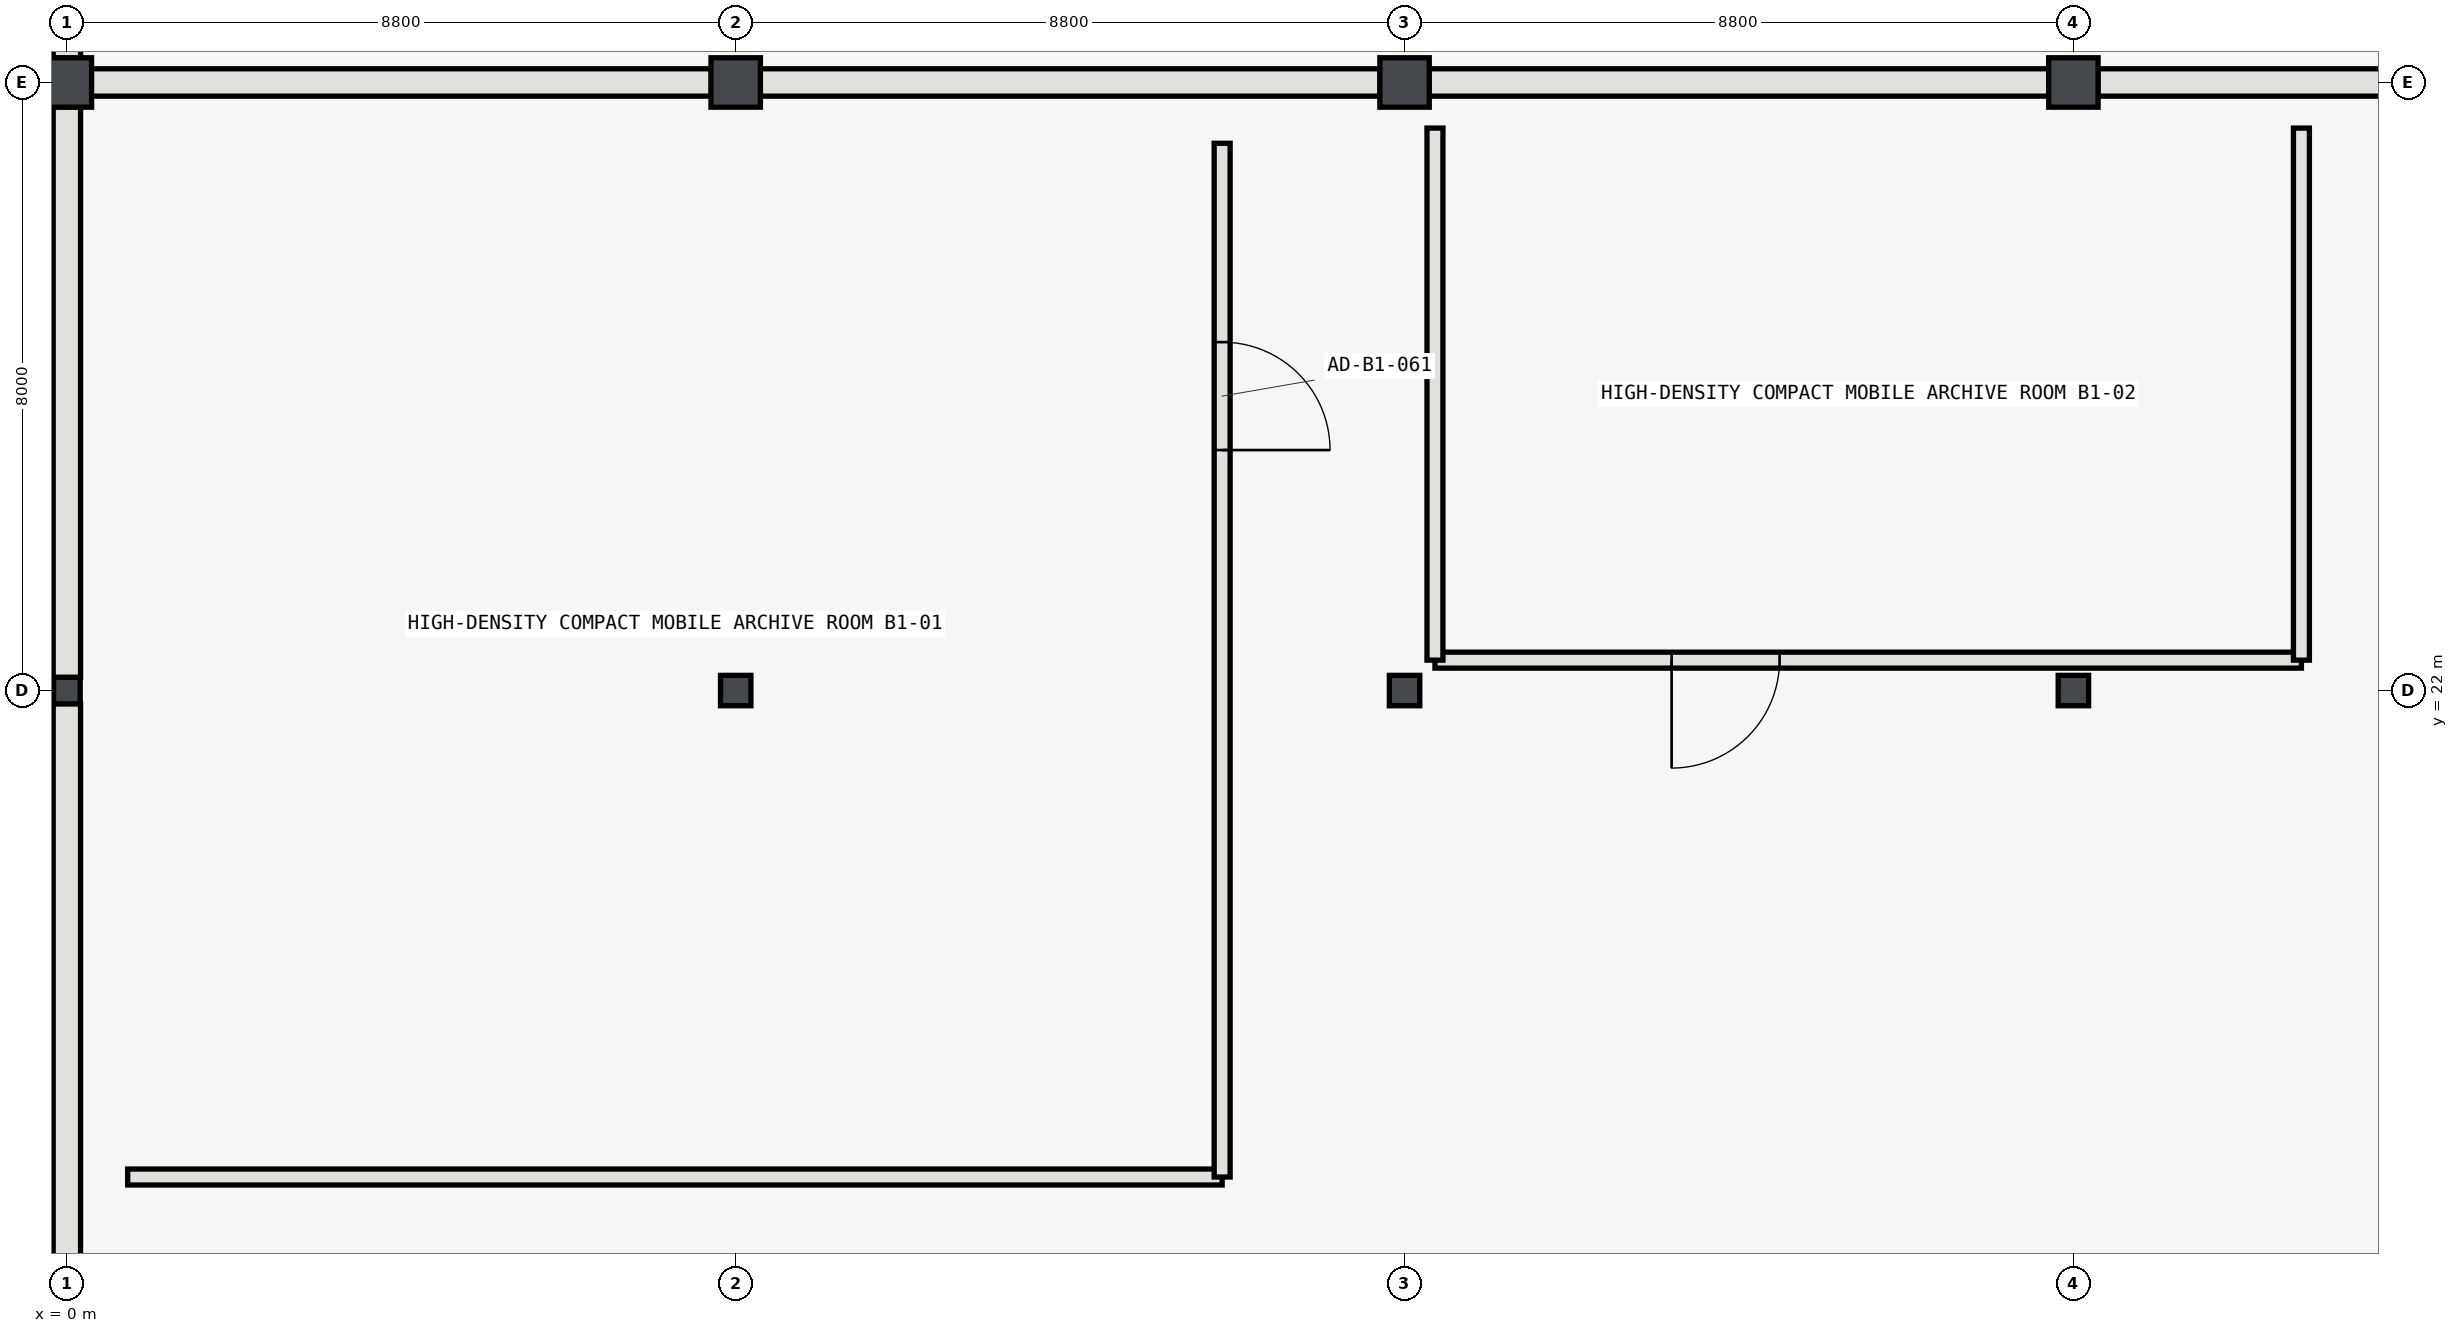
"""IFC4 building model, lengths in metres.
Left out: names, types, materials, properties, quantities, classifications, styles, units other than length and angle.
Written with IfcOpenShell. Run it as: python <this file> out.ifc"""

import sys

from ifc_helpers import new_model, si_unit, direction, frame, frame_2d, origin, origin_2d, place, context, subcontext, project, spatial, rectangle, hollow_rectangle, i_section, extrude, element, fill, save


model = new_model("IFC4")
c1 = context("Model", 3, precision=1e-05, world=origin(), true_north=direction((0.0, 1.0)))
c2 = subcontext(c1, "Body", "Model", "MODEL_VIEW")
j1 = project(units=[si_unit("LENGTHUNIT", "METRE"), si_unit("PLANEANGLEUNIT", "RADIAN")], contexts=[c1])
p1 = place(None, origin())
s1 = spatial("IfcSite", under=j1, at=p1, CompositionType="ELEMENT")
p2 = place(p1, origin())
s2 = spatial("IfcBuilding", under=s1, at=p2, CompositionType="ELEMENT")
p3 = place(p2, frame((0.0, 0.0, -4.8)))
s3 = spatial("IfcBuildingStorey", under=s2, at=p3, CompositionType="ELEMENT", Elevation=-4.8)
p4 = place(p3, frame((0.0, 22.0, 0.0), z_axis=(0.0, 0.0, 1.0), x_axis=(1.0, 0.0, 0.0)))
e1 = element("IfcColumn", 1, at=p4, inside=s3, PredefinedType="COLUMN", context=c2, shape_type="SweptSolid", body=[
    extrude(i_section(OverallWidth=0.35, OverallDepth=0.35, WebThickness=0.012, FlangeThickness=0.019, FilletRadius=0.02, at=origin_2d()), origin(), (0.0, 0.0, 1.0), 4.8),
])
p5 = place(p3, frame((0.0, 30.0, 0.0), z_axis=(0.0, 0.0, 1.0), x_axis=(1.0, 0.0, 0.0)))
e2 = element("IfcColumn", 2, at=p5, inside=s3, PredefinedType="COLUMN", context=c2, shape_type="SweptSolid", body=[
    extrude(hollow_rectangle(XDim=0.65, YDim=0.65, WallThickness=0.026, InnerFilletRadius=0.026, OuterFilletRadius=0.052, at=origin_2d()), origin(), (0.0, 0.0, 1.0), 4.8),
])
p6 = place(p3, frame((8.8, 22.0, 0.0), z_axis=(0.0, 0.0, 1.0), x_axis=(1.0, 0.0, 0.0)))
e3 = element("IfcColumn", 3, at=p6, inside=s3, PredefinedType="COLUMN", context=c2, shape_type="SweptSolid", body=[
    extrude(hollow_rectangle(XDim=0.4, YDim=0.4, WallThickness=0.016, InnerFilletRadius=0.016, OuterFilletRadius=0.032, at=origin_2d()), origin(), (0.0, 0.0, 1.0), 4.8),
])
p7 = place(p3, frame((8.8, 30.0, 0.0), z_axis=(0.0, 0.0, 1.0), x_axis=(1.0, 0.0, 0.0)))
e4 = element("IfcColumn", 4, at=p7, inside=s3, PredefinedType="COLUMN", context=c2, shape_type="SweptSolid", body=[
    extrude(hollow_rectangle(XDim=0.65, YDim=0.65, WallThickness=0.026, InnerFilletRadius=0.026, OuterFilletRadius=0.052, at=origin_2d()), origin(), (0.0, 0.0, 1.0), 4.8),
])
p8 = place(p3, frame((17.6, 22.0, 0.0), z_axis=(0.0, 0.0, 1.0), x_axis=(1.0, 0.0, 0.0)))
e5 = element("IfcColumn", 5, at=p8, inside=s3, PredefinedType="COLUMN", context=c2, shape_type="SweptSolid", body=[
    extrude(hollow_rectangle(XDim=0.4, YDim=0.4, WallThickness=0.016, InnerFilletRadius=0.016, OuterFilletRadius=0.032, at=origin_2d()), origin(), (0.0, 0.0, 1.0), 4.8),
])
p9 = place(p3, frame((17.6, 30.0, 0.0), z_axis=(0.0, 0.0, 1.0), x_axis=(1.0, 0.0, 0.0)))
e6 = element("IfcColumn", 6, at=p9, inside=s3, PredefinedType="COLUMN", context=c2, shape_type="SweptSolid", body=[
    extrude(hollow_rectangle(XDim=0.65, YDim=0.65, WallThickness=0.026, InnerFilletRadius=0.026, OuterFilletRadius=0.052, at=origin_2d()), origin(), (0.0, 0.0, 1.0), 4.8),
])
p10 = place(p3, frame((26.4, 22.0, 0.0), z_axis=(0.0, 0.0, 1.0), x_axis=(1.0, 0.0, 0.0)))
e7 = element("IfcColumn", 7, at=p10, inside=s3, PredefinedType="COLUMN", context=c2, shape_type="SweptSolid", body=[
    extrude(hollow_rectangle(XDim=0.4, YDim=0.4, WallThickness=0.016, InnerFilletRadius=0.016, OuterFilletRadius=0.032, at=origin_2d()), origin(), (0.0, 0.0, 1.0), 4.8),
])
p11 = place(p3, frame((26.4, 30.0, 0.0), z_axis=(0.0, 0.0, 1.0), x_axis=(1.0, 0.0, 0.0)))
e8 = element("IfcColumn", 8, at=p11, inside=s3, PredefinedType="COLUMN", context=c2, shape_type="SweptSolid", body=[
    extrude(hollow_rectangle(XDim=0.65, YDim=0.65, WallThickness=0.026, InnerFilletRadius=0.026, OuterFilletRadius=0.052, at=origin_2d()), origin(), (0.0, 0.0, 1.0), 4.8),
])
for number, where, z_axis, x_axis in (
    (9, (8.479, 30.0, 0.0), (0.0, 0.0, 1.0), (-1.0, 0.0, 0.0)),
    (10, (17.279, 30.0, 0.0), (0.0, 0.0, 1.0), (-1.0, 0.0, 0.0)),
):
    element("IfcWall", number, at=place(p3, frame(where, z_axis=z_axis, x_axis=x_axis)), inside=s3, PredefinedType="USERDEFINED", context=c2, shape_type="SweptSolid", body=[
        extrude(rectangle(XDim=8.158, YDim=0.36, at=frame_2d((4.079, 0.0))), origin(), (0.0, 0.0, 1.0), 3.995),
    ])
p12 = place(p3, frame((26.079, 30.0, 0.0), z_axis=(0.0, 0.0, 1.0), x_axis=(-1.0, 0.0, 0.0)))
e11 = element("IfcWall", 11, at=p12, inside=s3, PredefinedType="USERDEFINED", context=c2, shape_type="SweptSolid", body=[
    extrude(rectangle(XDim=8.158, YDim=0.36, at=frame_2d((4.079, 0.0))), origin(), (0.0, 0.0, 1.0), 3.995),
])
p13 = place(p3, frame((34.879, 30.0, 0.0), z_axis=(0.0, 0.0, 1.0), x_axis=(-1.0, 0.0, 0.0)))
e12 = element("IfcWall", 12, at=p13, inside=s3, PredefinedType="USERDEFINED", context=c2, shape_type="SweptSolid", body=[
    extrude(rectangle(XDim=8.158, YDim=0.36, at=frame_2d((4.079, 0.0))), origin(), (0.0, 0.0, 1.0), 3.995),
])
p14 = place(p3, frame((0.0, 21.829, 0.0), z_axis=(0.0, 0.0, 1.0), x_axis=(0.0, -1.0, 0.0)))
e13 = element("IfcWall", 13, at=p14, inside=s3, PredefinedType="USERDEFINED", context=c2, shape_type="SweptSolid", body=[
    extrude(rectangle(XDim=7.658, YDim=0.36, at=frame_2d((3.829, 0.0))), origin(), (0.0, 0.0, 1.0), 3.883),
])
p15 = place(p3, frame((0.0, 29.679, 0.0), z_axis=(0.0, 0.0, 1.0), x_axis=(0.0, -1.0, 0.0)))
e14 = element("IfcWall", 14, at=p15, inside=s3, PredefinedType="USERDEFINED", context=c2, shape_type="SweptSolid", body=[
    extrude(rectangle(XDim=7.508, YDim=0.36, at=frame_2d((3.754, 0.0))), origin(), (0.0, 0.0, 1.0), 3.883),
])
p16 = place(p3, frame((0.0, 37.679, 0.0), z_axis=(0.0, 0.0, 1.0), x_axis=(0.0, -1.0, 0.0)))
e15 = element("IfcWall", 15, at=p16, inside=s3, PredefinedType="USERDEFINED", context=c2, shape_type="SweptSolid", body=[
    extrude(rectangle(XDim=7.358, YDim=0.36, at=frame_2d((3.679, 0.0))), origin(), (0.0, 0.0, 1.0), 3.883),
])
p17 = place(p3, frame((0.8, 15.6, 0.0), z_axis=(0.0, 0.0, 1.0), x_axis=(1.0, 0.0, 0.0)))
e16 = element("IfcWall", 16, at=p17, inside=s3, PredefinedType="PARTITIONING", context=c2, shape_type="SweptSolid", body=[
    extrude(rectangle(XDim=14.4, YDim=0.21, at=frame_2d((7.2, 0.0))), origin(), (0.0, 0.0, 1.0), 4.52),
])
p18 = place(p3, frame((15.2, 15.6, 0.0), z_axis=(0.0, 0.0, 1.0), x_axis=(0.0, 1.0, 0.0)))
e17 = element("IfcWall", 17, at=p18, inside=s3, PredefinedType="PARTITIONING", context=c2, shape_type="SweptSolid", body=[
    extrude(rectangle(XDim=13.6, YDim=0.21, at=frame_2d((6.8, 0.0))), origin(), (0.0, 0.0, 1.0), 4.52),
])
p19 = place(p18, frame((9.564, 0.0, 0.0)))
e18 = element("IfcOpeningElement", 18, at=p19, cuts=e17, PredefinedType="OPENING", context=c2, shape_type="SweptSolid", body=[
    extrude(rectangle(XDim=1.42, YDim=2.25, at=frame_2d((0.71, 1.125))), frame((0.0, 0.115, 0.0), z_axis=(0.0, -1.0, 0.0), x_axis=(1.0, 0.0, 0.0)), (0.0, 0.0, 1.0), 0.23),
])
p20 = place(p3, frame((18.0, 22.4, 0.0), z_axis=(0.0, 0.0, 1.0), x_axis=(1.0, 0.0, 0.0)))
e19 = element("IfcWall", 19, at=p20, inside=s3, PredefinedType="PARTITIONING", context=c2, shape_type="SweptSolid", body=[
    extrude(rectangle(XDim=11.4, YDim=0.21, at=frame_2d((5.7, 0.0))), origin(), (0.0, 0.0, 1.0), 4.52),
])
p21 = place(p20, frame((3.114, 0.0, 0.0)))
e20 = element("IfcOpeningElement", 20, at=p21, cuts=e19, PredefinedType="OPENING", context=c2, shape_type="SweptSolid", body=[
    extrude(rectangle(XDim=1.42, YDim=2.25, at=frame_2d((0.71, 1.125))), frame((0.0, 0.115, 0.0), z_axis=(0.0, -1.0, 0.0), x_axis=(1.0, 0.0, 0.0)), (0.0, 0.0, 1.0), 0.23),
])
for number, where, z_axis, x_axis in (
    (21, (18.0, 29.4, 0.0), (0.0, 0.0, 1.0), (0.0, -1.0, 0.0)),
    (22, (29.4, 22.4, 0.0), (0.0, 0.0, 1.0), (0.0, 1.0, 0.0)),
):
    element("IfcWall", number, at=place(p3, frame(where, z_axis=z_axis, x_axis=x_axis)), inside=s3, PredefinedType="PARTITIONING", context=c2, shape_type="SweptSolid", body=[
        extrude(rectangle(XDim=7.0, YDim=0.21, at=frame_2d((3.5, 0.0))), origin(), (0.0, 0.0, 1.0), 4.52),
    ])
p22 = place(p19, origin())
e23 = element("IfcDoor", 23, at=p22, inside=s3, OperationType="DOUBLE_DOOR_SINGLE_SWING", PredefinedType="DOOR", context=c2, shape_type="SweptSolid", body=[
    extrude(rectangle(XDim=1.42, YDim=2.25, at=frame_2d((0.71, 1.125))), frame((0.0, 0.025, 0.0), z_axis=(0.0, -1.0, 0.0), x_axis=(1.0, 0.0, 0.0)), (0.0, 0.0, 1.0), 0.05),
])
fill(e18, e23)
p23 = place(p21, origin())
e24 = element("IfcDoor", 24, at=p23, inside=s3, OperationType="DOUBLE_DOOR_SINGLE_SWING", PredefinedType="DOOR", context=c2, shape_type="SweptSolid", body=[
    extrude(rectangle(XDim=1.42, YDim=2.25, at=frame_2d((0.71, 1.125))), frame((0.0, 0.025, 0.0), z_axis=(0.0, -1.0, 0.0), x_axis=(1.0, 0.0, 0.0)), (0.0, 0.0, 1.0), 0.05),
])
fill(e20, e24)
save(model, sys.argv[1])
